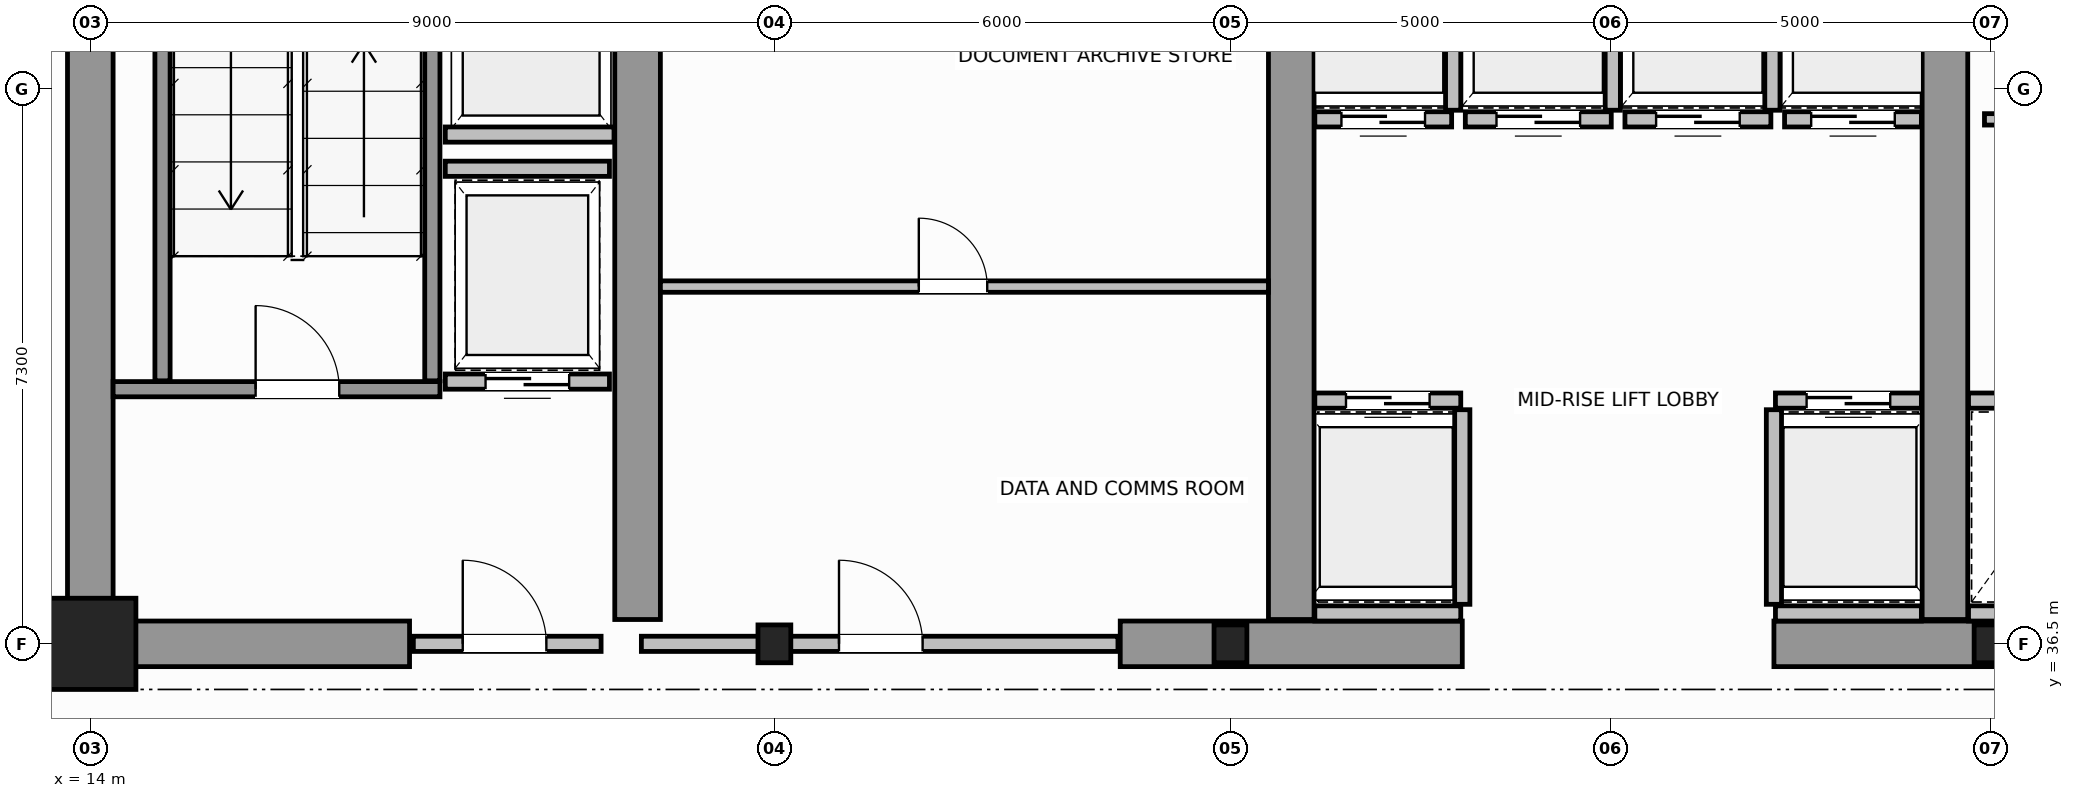
"""IFC4 building model, lengths in metres.
Left out: names, types, materials, properties, quantities, classifications, styles, units other than length and angle.
Written with IfcOpenShell. Run it as: python <this file> out.ifc"""

import sys

from ifc_helpers import new_model, si_unit, direction, frame, frame_2d, origin, origin_2d, place, context, subcontext, project, spatial, rectangle, i_section, extrude, source, transform, mapped, element, fill, save


model = new_model("IFC4")
c1 = context("Model", 3, precision=1e-05, world=origin(), true_north=direction((0.0, 1.0)))
c2 = subcontext(c1, "Body", "Model", "MODEL_VIEW")
j1 = project(units=[si_unit("LENGTHUNIT", "METRE"), si_unit("PLANEANGLEUNIT", "RADIAN")], contexts=[c1])
p1 = place(None, origin())
s1 = spatial("IfcSite", under=j1, at=p1, CompositionType="ELEMENT")
p2 = place(p1, origin())
s2 = spatial("IfcBuilding", under=s1, at=p2, CompositionType="ELEMENT")
p3 = place(p2, frame((0.0, 0.0, 195.6)))
s3 = spatial("IfcBuildingStorey", under=s2, at=p3, CompositionType="ELEMENT", Elevation=195.6)
m1 = source(origin(), c2, "Body", "SweptSolid", [
    extrude(rectangle(XDim=1.2, YDim=1.2, at=origin_2d()), origin(), (0.0, 0.0, 1.0), 3.8),
])
p4 = place(p3, frame((14.0, 36.5, 0.0), z_axis=(0.0, 0.0, 1.0), x_axis=(1.0, 0.0, 0.0)))
e1 = element("IfcColumn", 1, at=p4, inside=s3, PredefinedType="COLUMN", context=c2, shape_type="MappedRepresentation", body=[
    mapped(m1, transform((0.0, 0.0, 0.0), scale=1.0)),
])
m2 = source(origin(), c2, "Body", "SweptSolid", [
    extrude(i_section(OverallWidth=0.432, OverallDepth=0.498, WebThickness=0.055, FlangeThickness=0.068, FilletRadius=0.015, at=origin_2d()), origin(), (0.0, 0.0, 1.0), 3.8),
])
for number, where, z_axis, x_axis in (
    (2, (23.0, 36.5, 0.0), (0.0, 0.0, 1.0), (1.0, 0.0, 0.0)),
    (3, (29.0, 36.5, 0.0), (0.0, 0.0, 1.0), (1.0, 0.0, 0.0)),
    (4, (39.0, 36.5, 0.0), (0.0, 0.0, 1.0), (1.0, 0.0, 0.0)),
):
    element("IfcColumn", number, at=place(p3, frame(where, z_axis=z_axis, x_axis=x_axis)), inside=s3, PredefinedType="COLUMN", context=c2, shape_type="MappedRepresentation", body=[
        mapped(m2, transform((0.0, 0.0, 0.0), scale=1.0)),
    ])
p5 = place(p3, frame((14.0, 36.5, 0.0), z_axis=(0.0, 0.0, 1.0), x_axis=(0.0, 1.0, 0.0)))
e5 = element("IfcWall", 5, at=p5, inside=s3, PredefinedType="SHEAR", context=c2, shape_type="SweptSolid", body=[
    extrude(rectangle(XDim=14.5, YDim=0.6, at=frame_2d((7.25, 0.0))), origin(), (0.0, 0.0, 1.0), 3.8),
])
p6 = place(p3, frame((14.32, 36.5, 0.0), z_axis=(0.0, 0.0, 1.0), x_axis=(1.0, 0.0, 0.0)))
e6 = element("IfcWall", 6, at=p6, inside=s3, PredefinedType="SHEAR", context=c2, shape_type="SweptSolid", body=[
    extrude(rectangle(XDim=3.88, YDim=0.6, at=frame_2d((1.94, 0.0))), origin(), (0.0, 0.0, 1.0), 2.58),
])
for number, where, z_axis, x_axis in (
    (7, (27.55, 36.5, 0.0), (0.0, 0.0, 1.0), (1.0, 0.0, 0.0)),
    (8, (36.15, 36.5, 0.0), (0.0, 0.0, 1.0), (1.0, 0.0, 0.0)),
):
    element("IfcWall", number, at=place(p3, frame(where, z_axis=z_axis, x_axis=x_axis)), inside=s3, PredefinedType="SHEAR", context=c2, shape_type="SweptSolid", body=[
        extrude(rectangle(XDim=4.5, YDim=0.6, at=frame_2d((2.25, 0.0))), origin(), (0.0, 0.0, 1.0), 3.8),
    ])
for number, where, z_axis, x_axis in (
    (9, (21.2, 36.82, 0.0), (0.0, 0.0, 1.0), (0.0, 1.0, 0.0)),
    (10, (29.8, 36.82, 0.0), (0.0, 0.0, 1.0), (0.0, 1.0, 0.0)),
    (11, (38.4, 36.82, 0.0), (0.0, 0.0, 1.0), (0.0, 1.0, 0.0)),
):
    element("IfcWall", number, at=place(p3, frame(where, z_axis=z_axis, x_axis=x_axis)), inside=s3, PredefinedType="SHEAR", context=c2, shape_type="SweptSolid", body=[
        extrude(rectangle(XDim=9.38, YDim=0.6, at=frame_2d((4.69, 0.0))), origin(), (0.0, 0.0, 1.0), 3.8),
    ])
p7 = place(p3, frame((14.3, 39.85, 0.0), z_axis=(0.0, 0.0, 1.0), x_axis=(1.0, 0.0, 0.0)))
e12 = element("IfcWall", 12, at=p7, inside=s3, PredefinedType="SOLIDWALL", context=c2, shape_type="SweptSolid", body=[
    extrude(rectangle(XDim=4.3, YDim=0.2, at=frame_2d((2.15, 0.0))), origin(), (0.0, 0.0, 1.0), 3.8),
])
p8 = place(p7, frame((1.875, 0.0, 0.0)))
e13 = element("IfcOpeningElement", 13, at=p8, cuts=e12, PredefinedType="OPENING", context=c2, shape_type="SweptSolid", body=[
    extrude(rectangle(XDim=1.1, YDim=2.15, at=frame_2d((0.55, 1.075))), frame((0.0, 0.11, 0.0), z_axis=(0.0, -1.0, 0.0), x_axis=(1.0, 0.0, 0.0)), (0.0, 0.0, 1.0), 0.22),
])
for number, where, z_axis, x_axis in (
    (14, (14.95, 39.96, 0.0), (0.0, 0.0, 1.0), (0.0, 1.0, 0.0)),
    (15, (18.5, 39.96, 0.0), (0.0, 0.0, 1.0), (0.0, 1.0, 0.0)),
):
    element("IfcWall", number, at=place(p3, frame(where, z_axis=z_axis, x_axis=x_axis)), inside=s3, PredefinedType="SOLIDWALL", context=c2, shape_type="SweptSolid", body=[
        extrude(rectangle(XDim=9.93, YDim=0.2, at=frame_2d((4.965, 0.0))), origin(), (0.0, 0.0, 1.0), 3.8),
    ])
p9 = place(p3, frame((18.25, 36.5, 0.0), z_axis=(0.0, 0.0, 1.0), x_axis=(1.0, 0.0, 0.0)))
e16 = element("IfcWall", 16, at=p9, inside=s3, PredefinedType="SOLIDWALL", context=c2, shape_type="SweptSolid", body=[
    extrude(rectangle(XDim=2.47, YDim=0.2, at=frame_2d((1.235, 0.0))), origin(), (0.0, 0.0, 1.0), 2.57),
])
p10 = place(p9, frame((0.65, 0.0, 0.0)))
e17 = element("IfcOpeningElement", 17, at=p10, cuts=e16, PredefinedType="OPENING", context=c2, shape_type="SweptSolid", body=[
    extrude(rectangle(XDim=1.1, YDim=2.15, at=frame_2d((0.55, 1.075))), frame((0.0, 0.11, 0.0), z_axis=(0.0, -1.0, 0.0), x_axis=(1.0, 0.0, 0.0)), (0.0, 0.0, 1.0), 0.22),
])
p11 = place(p3, frame((30.11, 39.7, 0.0), z_axis=(0.0, 0.0, 1.0), x_axis=(1.0, 0.0, 0.0)))
e18 = element("IfcWall", 18, at=p11, inside=s3, PredefinedType="SOLIDWALL", context=c2, shape_type="SweptSolid", body=[
    extrude(rectangle(XDim=1.92, YDim=0.2, at=frame_2d((0.96, 0.0))), origin(), (0.0, 0.0, 1.0), 3.58),
])
p12 = place(p11, frame((0.41, 0.0, 0.0)))
e19 = element("IfcOpeningElement", 19, at=p12, cuts=e18, PredefinedType="OPENING", context=c2, shape_type="SweptSolid", body=[
    extrude(rectangle(XDim=1.1, YDim=2.15, at=frame_2d((0.55, 1.075))), frame((0.0, 0.11, 0.0), z_axis=(0.0, -1.0, 0.0), x_axis=(1.0, 0.0, 0.0)), (0.0, 0.0, 1.0), 0.22),
])
p13 = place(p3, frame((30.11, 36.9, 0.0), z_axis=(0.0, 0.0, 1.0), x_axis=(1.0, 0.0, 0.0)))
e20 = element("IfcWall", 20, at=p13, inside=s3, PredefinedType="SOLIDWALL", context=c2, shape_type="SweptSolid", body=[
    extrude(rectangle(XDim=1.92, YDim=0.2, at=frame_2d((0.96, 0.0))), origin(), (0.0, 0.0, 1.0), 3.58),
])
p14 = place(p3, frame((32.05, 37.02, 0.0), z_axis=(0.0, 0.0, 1.0), x_axis=(0.0, 1.0, 0.0)))
e21 = element("IfcWall", 21, at=p14, inside=s3, PredefinedType="SOLIDWALL", context=c2, shape_type="SweptSolid", body=[
    extrude(rectangle(XDim=2.56, YDim=0.2, at=frame_2d((1.28, 0.0))), origin(), (0.0, 0.0, 1.0), 3.58),
])
p15 = place(p3, frame((36.17, 39.7, 0.0), z_axis=(0.0, 0.0, 1.0), x_axis=(1.0, 0.0, 0.0)))
e22 = element("IfcWall", 22, at=p15, inside=s3, PredefinedType="SOLIDWALL", context=c2, shape_type="SweptSolid", body=[
    extrude(rectangle(XDim=1.92, YDim=0.2, at=frame_2d((0.96, 0.0))), origin(), (0.0, 0.0, 1.0), 3.58),
])
p16 = place(p15, frame((0.41, 0.0, 0.0)))
e23 = element("IfcOpeningElement", 23, at=p16, cuts=e22, PredefinedType="OPENING", context=c2, shape_type="SweptSolid", body=[
    extrude(rectangle(XDim=1.1, YDim=2.15, at=frame_2d((0.55, 1.075))), frame((0.0, 0.11, 0.0), z_axis=(0.0, -1.0, 0.0), x_axis=(1.0, 0.0, 0.0)), (0.0, 0.0, 1.0), 0.22),
])
p17 = place(p3, frame((36.17, 36.9, 0.0), z_axis=(0.0, 0.0, 1.0), x_axis=(1.0, 0.0, 0.0)))
e24 = element("IfcWall", 24, at=p17, inside=s3, PredefinedType="SOLIDWALL", context=c2, shape_type="SweptSolid", body=[
    extrude(rectangle(XDim=1.92, YDim=0.2, at=frame_2d((0.96, 0.0))), origin(), (0.0, 0.0, 1.0), 3.58),
])
p18 = place(p3, frame((36.15, 37.02, 0.0), z_axis=(0.0, 0.0, 1.0), x_axis=(0.0, 1.0, 0.0)))
e25 = element("IfcWall", 25, at=p18, inside=s3, PredefinedType="SOLIDWALL", context=c2, shape_type="SweptSolid", body=[
    extrude(rectangle(XDim=2.56, YDim=0.2, at=frame_2d((1.28, 0.0))), origin(), (0.0, 0.0, 1.0), 3.58),
])
p19 = place(p3, frame((30.11, 43.4, 0.0), z_axis=(0.0, 0.0, 1.0), x_axis=(1.0, 0.0, 0.0)))
e26 = element("IfcWall", 26, at=p19, inside=s3, PredefinedType="SOLIDWALL", context=c2, shape_type="SweptSolid", body=[
    extrude(rectangle(XDim=1.8, YDim=0.2, at=frame_2d((0.9, 0.0))), origin(), (0.0, 0.0, 1.0), 3.58),
])
p20 = place(p19, frame((0.35, 0.0, 0.0)))
e27 = element("IfcOpeningElement", 27, at=p20, cuts=e26, PredefinedType="OPENING", context=c2, shape_type="SweptSolid", body=[
    extrude(rectangle(XDim=1.1, YDim=2.15, at=frame_2d((0.55, 1.075))), frame((0.0, 0.11, 0.0), z_axis=(0.0, -1.0, 0.0), x_axis=(1.0, 0.0, 0.0)), (0.0, 0.0, 1.0), 0.22),
])
p21 = place(p3, frame((31.93, 43.52, 0.0), z_axis=(0.0, 0.0, 1.0), x_axis=(0.0, 1.0, 0.0)))
e28 = element("IfcWall", 28, at=p21, inside=s3, PredefinedType="SOLIDWALL", context=c2, shape_type="SweptSolid", body=[
    extrude(rectangle(XDim=2.56, YDim=0.2, at=frame_2d((1.28, 0.0))), origin(), (0.0, 0.0, 1.0), 3.58),
])
p22 = place(p3, frame((32.09, 43.4, 0.0), z_axis=(0.0, 0.0, 1.0), x_axis=(1.0, 0.0, 0.0)))
e29 = element("IfcWall", 29, at=p22, inside=s3, PredefinedType="SOLIDWALL", context=c2, shape_type="SweptSolid", body=[
    extrude(rectangle(XDim=1.92, YDim=0.2, at=frame_2d((0.96, 0.0))), origin(), (0.0, 0.0, 1.0), 3.58),
])
p23 = place(p22, frame((0.41, 0.0, 0.0)))
e30 = element("IfcOpeningElement", 30, at=p23, cuts=e29, PredefinedType="OPENING", context=c2, shape_type="SweptSolid", body=[
    extrude(rectangle(XDim=1.1, YDim=2.15, at=frame_2d((0.55, 1.075))), frame((0.0, 0.11, 0.0), z_axis=(0.0, -1.0, 0.0), x_axis=(1.0, 0.0, 0.0)), (0.0, 0.0, 1.0), 0.22),
])
p24 = place(p3, frame((34.03, 43.52, 0.0), z_axis=(0.0, 0.0, 1.0), x_axis=(0.0, 1.0, 0.0)))
e31 = element("IfcWall", 31, at=p24, inside=s3, PredefinedType="SOLIDWALL", context=c2, shape_type="SweptSolid", body=[
    extrude(rectangle(XDim=2.56, YDim=0.2, at=frame_2d((1.28, 0.0))), origin(), (0.0, 0.0, 1.0), 3.58),
])
p25 = place(p3, frame((34.19, 43.4, 0.0), z_axis=(0.0, 0.0, 1.0), x_axis=(1.0, 0.0, 0.0)))
e32 = element("IfcWall", 32, at=p25, inside=s3, PredefinedType="SOLIDWALL", context=c2, shape_type="SweptSolid", body=[
    extrude(rectangle(XDim=1.92, YDim=0.2, at=frame_2d((0.96, 0.0))), origin(), (0.0, 0.0, 1.0), 3.58),
])
p26 = place(p25, frame((0.41, 0.0, 0.0)))
e33 = element("IfcOpeningElement", 33, at=p26, cuts=e32, PredefinedType="OPENING", context=c2, shape_type="SweptSolid", body=[
    extrude(rectangle(XDim=1.1, YDim=2.15, at=frame_2d((0.55, 1.075))), frame((0.0, 0.11, 0.0), z_axis=(0.0, -1.0, 0.0), x_axis=(1.0, 0.0, 0.0)), (0.0, 0.0, 1.0), 0.22),
])
p27 = place(p3, frame((36.13, 43.52, 0.0), z_axis=(0.0, 0.0, 1.0), x_axis=(0.0, 1.0, 0.0)))
e34 = element("IfcWall", 34, at=p27, inside=s3, PredefinedType="SOLIDWALL", context=c2, shape_type="SweptSolid", body=[
    extrude(rectangle(XDim=2.56, YDim=0.2, at=frame_2d((1.28, 0.0))), origin(), (0.0, 0.0, 1.0), 3.58),
])
p28 = place(p3, frame((36.29, 43.4, 0.0), z_axis=(0.0, 0.0, 1.0), x_axis=(1.0, 0.0, 0.0)))
e35 = element("IfcWall", 35, at=p28, inside=s3, PredefinedType="SOLIDWALL", context=c2, shape_type="SweptSolid", body=[
    extrude(rectangle(XDim=1.8, YDim=0.2, at=frame_2d((0.9, 0.0))), origin(), (0.0, 0.0, 1.0), 3.58),
])
p29 = place(p28, frame((0.35, 0.0, 0.0)))
e36 = element("IfcOpeningElement", 36, at=p29, cuts=e35, PredefinedType="OPENING", context=c2, shape_type="SweptSolid", body=[
    extrude(rectangle(XDim=1.1, YDim=2.15, at=frame_2d((0.55, 1.075))), frame((0.0, 0.11, 0.0), z_axis=(0.0, -1.0, 0.0), x_axis=(1.0, 0.0, 0.0)), (0.0, 0.0, 1.0), 0.22),
])
for number, where, z_axis, x_axis in (
    (37, (38.71, 39.7, 0.0), (0.0, 0.0, 1.0), (1.0, 0.0, 0.0)),
    (38, (38.71, 36.9, 0.0), (0.0, 0.0, 1.0), (1.0, 0.0, 0.0)),
):
    element("IfcWall", number, at=place(p3, frame(where, z_axis=z_axis, x_axis=x_axis)), inside=s3, PredefinedType="SOLIDWALL", context=c2, shape_type="SweptSolid", body=[
        extrude(rectangle(XDim=1.92, YDim=0.2, at=frame_2d((0.96, 0.0))), origin(), (0.0, 0.0, 1.0), 3.58),
    ])
p30 = place(p3, frame((18.67, 43.2, 0.0), z_axis=(0.0, 0.0, 1.0), x_axis=(1.0, 0.0, 0.0)))
e39 = element("IfcWall", 39, at=p30, inside=s3, PredefinedType="SOLIDWALL", context=c2, shape_type="SweptSolid", body=[
    extrude(rectangle(XDim=2.22, YDim=0.2, at=frame_2d((1.11, 0.0))), origin(), (0.0, 0.0, 1.0), 3.58),
])
p31 = place(p3, frame((18.67, 39.95, 0.0), z_axis=(0.0, 0.0, 1.0), x_axis=(1.0, 0.0, 0.0)))
e40 = element("IfcWall", 40, at=p31, inside=s3, PredefinedType="SOLIDWALL", context=c2, shape_type="SweptSolid", body=[
    extrude(rectangle(XDim=2.16, YDim=0.2, at=frame_2d((1.08, 0.0))), origin(), (0.0, 0.0, 1.0), 3.58),
])
p32 = place(p31, frame((0.53, 0.0, 0.0)))
e41 = element("IfcOpeningElement", 41, at=p32, cuts=e40, PredefinedType="OPENING", context=c2, shape_type="SweptSolid", body=[
    extrude(rectangle(XDim=1.1, YDim=2.15, at=frame_2d((0.55, 1.075))), frame((0.0, 0.11, 0.0), z_axis=(0.0, -1.0, 0.0), x_axis=(1.0, 0.0, 0.0)), (0.0, 0.0, 1.0), 0.22),
])
p33 = place(p3, frame((18.67, 42.75, 0.0), z_axis=(0.0, 0.0, 1.0), x_axis=(1.0, 0.0, 0.0)))
e42 = element("IfcWall", 42, at=p33, inside=s3, PredefinedType="SOLIDWALL", context=c2, shape_type="SweptSolid", body=[
    extrude(rectangle(XDim=2.16, YDim=0.2, at=frame_2d((1.08, 0.0))), origin(), (0.0, 0.0, 1.0), 3.58),
])
p34 = place(p3, frame((21.25, 36.5, 0.0), z_axis=(0.0, 0.0, 1.0), x_axis=(1.0, 0.0, 0.0)))
e43 = element("IfcWall", 43, at=p34, inside=s3, PredefinedType="SOLIDWALL", context=c2, shape_type="SweptSolid", body=[
    extrude(rectangle(XDim=6.27, YDim=0.2, at=frame_2d((3.135, 0.0))), origin(), (0.0, 0.0, 1.0), 2.57),
])
p35 = place(p34, frame((2.6, 0.0, 0.0)))
e44 = element("IfcOpeningElement", 44, at=p35, cuts=e43, PredefinedType="OPENING", context=c2, shape_type="SweptSolid", body=[
    extrude(rectangle(XDim=1.1, YDim=2.15, at=frame_2d((0.55, 1.075))), frame((0.0, 0.11, 0.0), z_axis=(0.0, -1.0, 0.0), x_axis=(1.0, 0.0, 0.0)), (0.0, 0.0, 1.0), 0.22),
])
p36 = place(p3, frame((21.5, 41.2, 0.0), z_axis=(0.0, 0.0, 1.0), x_axis=(1.0, 0.0, 0.0)))
e45 = element("IfcWall", 45, at=p36, inside=s3, PredefinedType="PARTITIONING", context=c2, shape_type="SweptSolid", body=[
    extrude(rectangle(XDim=8.0, YDim=0.15, at=frame_2d((4.0, 0.0))), origin(), (0.0, 0.0, 1.0), 3.58),
])
p37 = place(p36, frame((3.4, 0.0, 0.0)))
e46 = element("IfcOpeningElement", 46, at=p37, cuts=e45, PredefinedType="OPENING", context=c2, shape_type="SweptSolid", body=[
    extrude(rectangle(XDim=0.9, YDim=2.1, at=frame_2d((0.45, 1.05))), frame((0.0, 0.085, 0.0), z_axis=(0.0, -1.0, 0.0), x_axis=(1.0, 0.0, 0.0)), (0.0, 0.0, 1.0), 0.17),
])
p38 = place(p3, frame((38.92, 43.4, 0.0), z_axis=(0.0, 0.0, 1.0), x_axis=(1.0, 0.0, 0.0)))
e47 = element("IfcWall", 47, at=p38, inside=s3, PredefinedType="PARTITIONING", context=c2, shape_type="SweptSolid", body=[
    extrude(rectangle(XDim=1.6, YDim=0.15, at=frame_2d((0.8, 0.0))), origin(), (0.0, 0.0, 1.0), 3.58),
])
p39 = place(p38, frame((0.35, 0.0, 0.0)))
e48 = element("IfcOpeningElement", 48, at=p39, cuts=e47, PredefinedType="OPENING", context=c2, shape_type="SweptSolid", body=[
    extrude(rectangle(XDim=0.9, YDim=2.1, at=frame_2d((0.45, 1.05))), frame((0.0, 0.085, 0.0), z_axis=(0.0, -1.0, 0.0), x_axis=(1.0, 0.0, 0.0)), (0.0, 0.0, 1.0), 0.17),
])
p40 = place(p3, frame((7.289, 36.48, 0.0), z_axis=(0.0, 0.0, 1.0), x_axis=(1.0, 0.0, 0.0)))
e49 = element("IfcWall", 49, at=p40, inside=s3, PredefinedType="PARTITIONING", context=c2, shape_type="SweptSolid", body=[
    extrude(rectangle(XDim=6.651, YDim=0.12, at=frame_2d((3.325, 0.0))), origin(), (0.0, 0.0, 1.0), 2.97),
])
p41 = place(p40, frame((2.875, 0.0, 0.0)))
e50 = element("IfcOpeningElement", 50, at=p41, cuts=e49, PredefinedType="OPENING", context=c2, shape_type="SweptSolid", body=[
    extrude(rectangle(XDim=0.9, YDim=2.15, at=frame_2d((0.45, 1.075))), frame((0.0, 0.07, 0.0), z_axis=(0.0, -1.0, 0.0), x_axis=(1.0, 0.0, 0.0)), (0.0, 0.0, 1.0), 0.14),
])
m3 = source(origin(), c2, "Body", "SweptSolid", [
    extrude(rectangle(XDim=1.1, YDim=2.15, at=frame_2d((0.55, 1.075))), frame((0.0, 0.025, 0.0), z_axis=(0.0, -1.0, 0.0), x_axis=(1.0, 0.0, 0.0)), (0.0, 0.0, 1.0), 0.05),
])
p42 = place(p8, origin())
e51 = element("IfcDoor", 51, at=p42, inside=s3, OperationType="SINGLE_SWING_LEFT", PredefinedType="DOOR", context=c2, shape_type="MappedRepresentation", body=[
    mapped(m3, transform((0.0, 0.0, 0.0), scale=1.0)),
])
fill(e13, e51)
p43 = place(p10, origin())
e52 = element("IfcDoor", 52, at=p43, inside=s3, OperationType="SINGLE_SWING_RIGHT", PredefinedType="DOOR", context=c2, shape_type="MappedRepresentation", body=[
    mapped(m3, transform((0.0, 0.0, 0.0), scale=1.0)),
])
fill(e17, e52)
p44 = place(p12, origin())
e53 = element("IfcDoor", 53, at=p44, inside=s3, OperationType="DOUBLE_DOOR_SLIDING", PredefinedType="DOOR", context=c2, shape_type="MappedRepresentation", body=[
    mapped(m3, transform((0.0, 0.0, 0.0), scale=1.0)),
])
fill(e19, e53)
p45 = place(p16, origin())
e54 = element("IfcDoor", 54, at=p45, inside=s3, OperationType="DOUBLE_DOOR_SLIDING", PredefinedType="DOOR", context=c2, shape_type="MappedRepresentation", body=[
    mapped(m3, transform((0.0, 0.0, 0.0), scale=1.0)),
])
fill(e23, e54)
p46 = place(p20, origin())
e55 = element("IfcDoor", 55, at=p46, inside=s3, OperationType="DOUBLE_DOOR_SLIDING", PredefinedType="DOOR", context=c2, shape_type="MappedRepresentation", body=[
    mapped(m3, transform((0.0, 0.0, 0.0), scale=1.0)),
])
fill(e27, e55)
p47 = place(p23, origin())
e56 = element("IfcDoor", 56, at=p47, inside=s3, OperationType="DOUBLE_DOOR_SLIDING", PredefinedType="DOOR", context=c2, shape_type="MappedRepresentation", body=[
    mapped(m3, transform((0.0, 0.0, 0.0), scale=1.0)),
])
fill(e30, e56)
p48 = place(p26, origin())
e57 = element("IfcDoor", 57, at=p48, inside=s3, OperationType="DOUBLE_DOOR_SLIDING", PredefinedType="DOOR", context=c2, shape_type="MappedRepresentation", body=[
    mapped(m3, transform((0.0, 0.0, 0.0), scale=1.0)),
])
fill(e33, e57)
p49 = place(p29, origin())
e58 = element("IfcDoor", 58, at=p49, inside=s3, OperationType="DOUBLE_DOOR_SLIDING", PredefinedType="DOOR", context=c2, shape_type="MappedRepresentation", body=[
    mapped(m3, transform((0.0, 0.0, 0.0), scale=1.0)),
])
fill(e36, e58)
p50 = place(p32, origin())
e59 = element("IfcDoor", 59, at=p50, inside=s3, OperationType="DOUBLE_DOOR_SLIDING", PredefinedType="DOOR", context=c2, shape_type="MappedRepresentation", body=[
    mapped(m3, transform((0.0, 0.0, 0.0), scale=1.0)),
])
fill(e41, e59)
p51 = place(p35, origin())
e60 = element("IfcDoor", 60, at=p51, inside=s3, OperationType="SINGLE_SWING_LEFT", PredefinedType="DOOR", context=c2, shape_type="MappedRepresentation", body=[
    mapped(m3, transform((0.0, 0.0, 0.0), scale=1.0)),
])
fill(e44, e60)
m4 = source(origin(), c2, "Body", "SweptSolid", [
    extrude(rectangle(XDim=0.9, YDim=2.1, at=frame_2d((0.45, 1.05))), frame((0.0, 0.025, 0.0), z_axis=(0.0, -1.0, 0.0), x_axis=(1.0, 0.0, 0.0)), (0.0, 0.0, 1.0), 0.05),
])
p52 = place(p37, origin())
e61 = element("IfcDoor", 61, at=p52, inside=s3, OperationType="SINGLE_SWING_RIGHT", PredefinedType="DOOR", context=c2, shape_type="MappedRepresentation", body=[
    mapped(m4, transform((0.0, 0.0, 0.0), scale=1.0)),
])
fill(e46, e61)
save(model, sys.argv[1])
